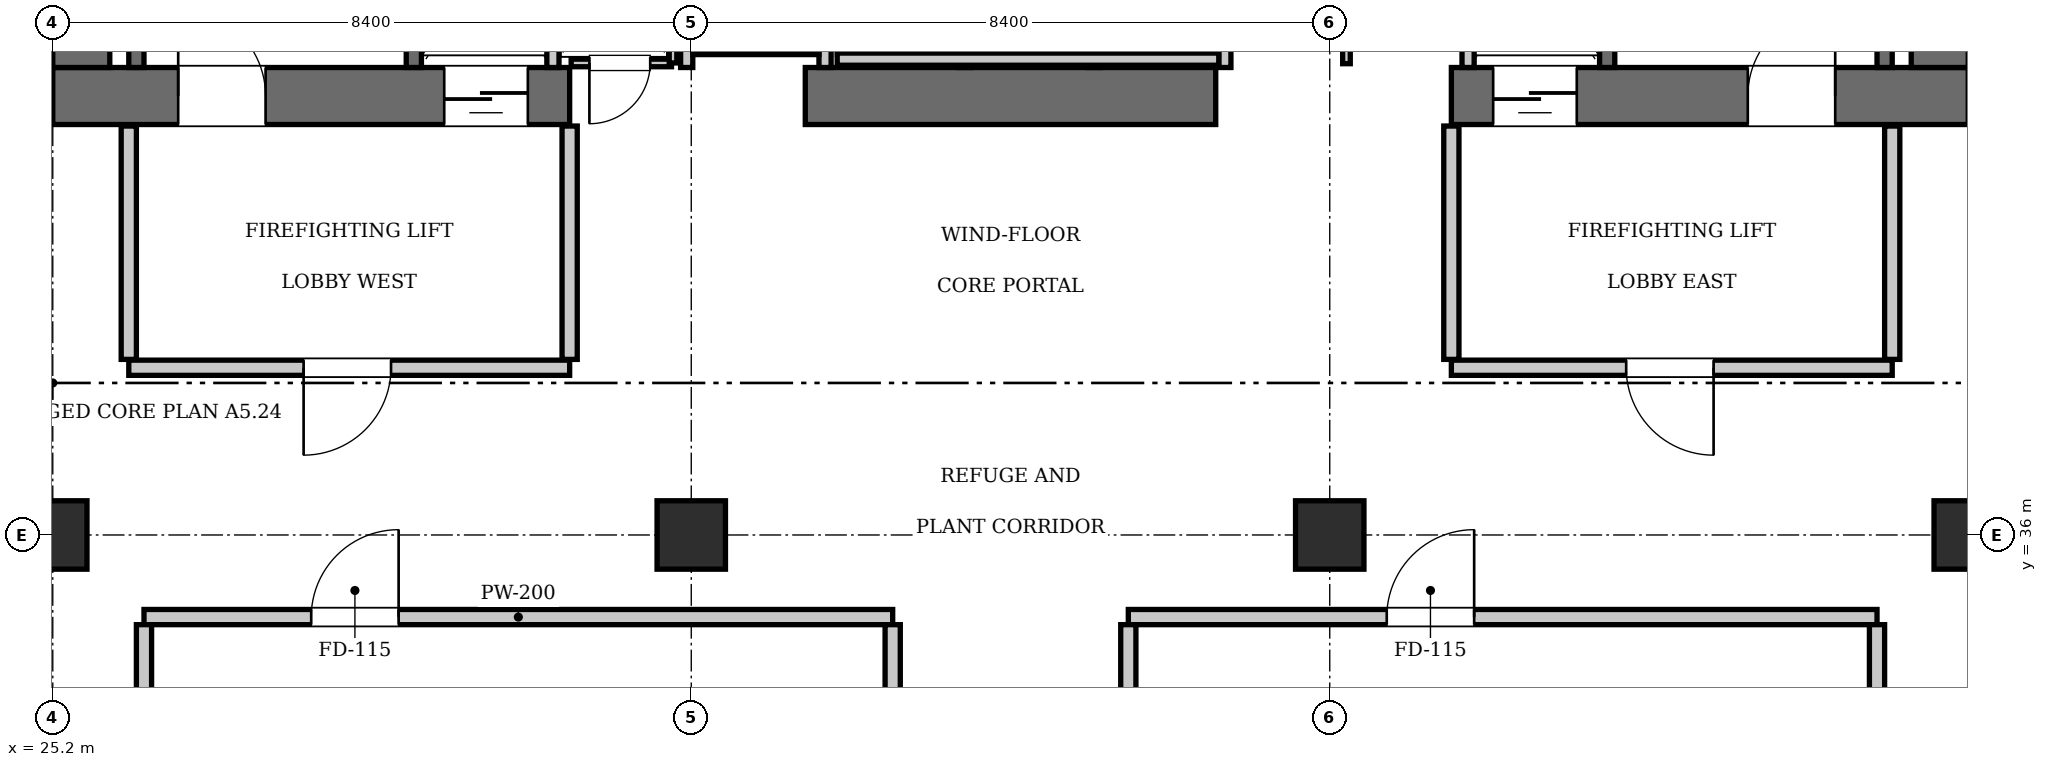
"""IFC4 building model, lengths in metres.
Left out: names, types, materials, properties, quantities, classifications, styles, units other than length and angle.
Written with IfcOpenShell. Run it as: python <this file> out.ifc"""

import sys

from ifc_helpers import new_model, si_unit, direction, frame, frame_2d, origin, origin_2d, place, context, subcontext, project, spatial, rectangle, extrude, element, fill, save


model = new_model("IFC4")
c1 = context("Model", 3, precision=1e-05, world=origin(), true_north=direction((0.0, 1.0)))
c2 = subcontext(c1, "Body", "Model", "MODEL_VIEW")
j1 = project(units=[si_unit("LENGTHUNIT", "METRE"), si_unit("PLANEANGLEUNIT", "RADIAN")], contexts=[c1])
p1 = place(None, origin())
s1 = spatial("IfcSite", under=j1, at=p1, CompositionType="ELEMENT")
p2 = place(p1, origin())
s2 = spatial("IfcBuilding", under=s1, at=p2, CompositionType="ELEMENT")
p3 = place(p2, frame((0.0, 0.0, 227.5)))
s3 = spatial("IfcBuildingStorey", under=s2, at=p3, CompositionType="ELEMENT", Elevation=227.5)
p4 = place(p3, frame((25.2, 41.775, 0.0), z_axis=(0.0, 0.0, 1.0), x_axis=(1.0, 0.0, 0.0)))
e1 = element("IfcWall", 1, at=p4, inside=s3, PredefinedType="SHEAR", context=c2, shape_type="SweptSolid", body=[
    extrude(rectangle(XDim=6.8, YDim=0.75, at=frame_2d((3.4, 0.0))), origin(), (0.0, 0.0, 1.0), 7.0),
])
p5 = place(p4, frame((1.65, 0.0, 0.0)))
e2 = element("IfcOpeningElement", 2, at=p5, cuts=e1, PredefinedType="OPENING", context=c2, shape_type="SweptSolid", body=[
    extrude(rectangle(XDim=1.15, YDim=2.15, at=frame_2d((0.575, 1.075))), frame((0.0, 0.385, 0.0), z_axis=(0.0, -1.0, 0.0), x_axis=(1.0, 0.0, 0.0)), (0.0, 0.0, 1.0), 0.77),
])
p6 = place(p4, frame((5.15, 0.0, 0.0)))
e3 = element("IfcOpeningElement", 3, at=p6, cuts=e1, PredefinedType="OPENING", context=c2, shape_type="SweptSolid", body=[
    extrude(rectangle(XDim=1.1, YDim=2.2, at=frame_2d((0.55, 1.1))), frame((0.0, 0.385, 0.0), z_axis=(0.0, -1.0, 0.0), x_axis=(1.0, 0.0, 0.0)), (0.0, 0.0, 1.0), 0.77),
])
p7 = place(p3, frame((35.1, 41.775, 0.0), z_axis=(0.0, 0.0, 1.0), x_axis=(1.0, 0.0, 0.0)))
e4 = element("IfcWall", 4, at=p7, inside=s3, PredefinedType="SHEAR", context=c2, shape_type="SweptSolid", body=[
    extrude(rectangle(XDim=5.4, YDim=0.75, at=frame_2d((2.7, 0.0))), origin(), (0.0, 0.0, 1.0), 7.0),
])
p8 = place(p3, frame((43.6, 41.775, 0.0), z_axis=(0.0, 0.0, 1.0), x_axis=(1.0, 0.0, 0.0)))
e5 = element("IfcWall", 5, at=p8, inside=s3, PredefinedType="SHEAR", context=c2, shape_type="SweptSolid", body=[
    extrude(rectangle(XDim=6.8, YDim=0.75, at=frame_2d((3.4, 0.0))), origin(), (0.0, 0.0, 1.0), 7.0),
])
p9 = place(p8, frame((3.9, 0.0, 0.0)))
e6 = element("IfcOpeningElement", 6, at=p9, cuts=e5, PredefinedType="OPENING", context=c2, shape_type="SweptSolid", body=[
    extrude(rectangle(XDim=1.15, YDim=2.15, at=frame_2d((0.575, 1.075))), frame((0.0, 0.385, 0.0), z_axis=(0.0, -1.0, 0.0), x_axis=(1.0, 0.0, 0.0)), (0.0, 0.0, 1.0), 0.77),
])
p10 = place(p8, frame((0.55, 0.0, 0.0)))
e7 = element("IfcOpeningElement", 7, at=p10, cuts=e5, PredefinedType="OPENING", context=c2, shape_type="SweptSolid", body=[
    extrude(rectangle(XDim=1.1, YDim=2.2, at=frame_2d((0.55, 1.1))), frame((0.0, 0.385, 0.0), z_axis=(0.0, -1.0, 0.0), x_axis=(1.0, 0.0, 0.0)), (0.0, 0.0, 1.0), 0.77),
])
for number, where, z_axis, x_axis in (
    (8, (25.575, 42.15, 0.0), (0.0, 0.0, 1.0), (0.0, 1.0, 0.0)),
    (9, (50.025, 42.15, 0.0), (0.0, 0.0, 1.0), (0.0, 1.0, 0.0)),
):
    element("IfcWall", number, at=place(p3, frame(where, z_axis=z_axis, x_axis=x_axis)), inside=s3, PredefinedType="SHEAR", context=c2, shape_type="SweptSolid", body=[
        extrude(rectangle(XDim=1.9, YDim=0.75, at=frame_2d((0.95, 0.0))), origin(), (0.0, 0.0, 1.0), 7.0),
    ])
for number, where, z_axis, x_axis in (
    (10, (25.2, 36.0, 0.0), (0.0, 0.0, 1.0), (1.0, 0.0, 0.0)),
    (11, (33.6, 36.0, 0.0), (0.0, 0.0, 1.0), (1.0, 0.0, 0.0)),
    (12, (42.0, 36.0, 0.0), (0.0, 0.0, 1.0), (1.0, 0.0, 0.0)),
    (13, (50.4, 36.0, 0.0), (0.0, 0.0, 1.0), (1.0, 0.0, 0.0)),
):
    element("IfcColumn", number, at=place(p3, frame(where, z_axis=z_axis, x_axis=x_axis)), inside=s3, PredefinedType="COLUMN", context=c2, shape_type="SweptSolid", body=[
        extrude(rectangle(XDim=0.9, YDim=0.9, at=origin_2d()), origin(), (0.0, 0.0, 1.0), 7.0),
    ])
p11 = place(p3, frame((29.95, 42.15, 0.0), z_axis=(0.0, 0.0, 1.0), x_axis=(0.0, 1.0, 0.0)))
e14 = element("IfcWall", 14, at=p11, inside=s3, PredefinedType="SOLIDWALL", context=c2, shape_type="SweptSolid", body=[
    extrude(rectangle(XDim=9.0, YDim=0.2, at=frame_2d((4.5, 0.0))), origin(), (0.0, 0.0, 1.0), 6.76),
])
p12 = place(p3, frame((26.3, 42.15, 0.0), z_axis=(0.0, 0.0, 1.0), x_axis=(0.0, 1.0, 0.0)))
e15 = element("IfcWall", 15, at=p12, inside=s3, PredefinedType="SOLIDWALL", context=c2, shape_type="SweptSolid", body=[
    extrude(rectangle(XDim=1.87, YDim=0.2, at=frame_2d((0.935, 0.0))), origin(), (0.0, 0.0, 1.0), 6.76),
])
p13 = place(p3, frame((45.65, 42.15, 0.0), z_axis=(0.0, 0.0, 1.0), x_axis=(0.0, 1.0, 0.0)))
e16 = element("IfcWall", 16, at=p13, inside=s3, PredefinedType="SOLIDWALL", context=c2, shape_type="SweptSolid", body=[
    extrude(rectangle(XDim=9.0, YDim=0.2, at=frame_2d((4.5, 0.0))), origin(), (0.0, 0.0, 1.0), 6.76),
])
p14 = place(p3, frame((49.3, 42.15, 0.0), z_axis=(0.0, 0.0, 1.0), x_axis=(0.0, 1.0, 0.0)))
e17 = element("IfcWall", 17, at=p14, inside=s3, PredefinedType="SOLIDWALL", context=c2, shape_type="SweptSolid", body=[
    extrude(rectangle(XDim=1.87, YDim=0.2, at=frame_2d((0.935, 0.0))), origin(), (0.0, 0.0, 1.0), 6.76),
])
for number, where, z_axis, x_axis in (
    (18, (31.78, 42.15, 0.0), (0.0, 0.0, 1.0), (0.0, 1.0, 0.0)),
    (19, (43.82, 42.15, 0.0), (0.0, 0.0, 1.0), (0.0, 1.0, 0.0)),
):
    element("IfcWall", number, at=place(p3, frame(where, z_axis=z_axis, x_axis=x_axis)), inside=s3, PredefinedType="SOLIDWALL", context=c2, shape_type="SweptSolid", body=[
        extrude(rectangle(XDim=2.59, YDim=0.16, at=frame_2d((1.295, 0.0))), origin(), (0.0, 0.0, 1.0), 6.76),
    ])
for number, where, z_axis, x_axis in (
    (20, (37.2, 42.15, 0.0), (0.0, 0.0, 1.0), (0.0, 1.0, 0.0)),
    (21, (38.9, 42.15, 0.0), (0.0, 0.0, 1.0), (0.0, 1.0, 0.0)),
    (22, (40.62, 42.15, 0.0), (0.0, 0.0, 1.0), (0.0, 1.0, 0.0)),
):
    element("IfcWall", number, at=place(p3, frame(where, z_axis=z_axis, x_axis=x_axis)), inside=s3, PredefinedType="SOLIDWALL", context=c2, shape_type="SweptSolid", body=[
        extrude(rectangle(XDim=2.2, YDim=0.16, at=frame_2d((1.1, 0.0))), origin(), (0.0, 0.0, 1.0), 6.76),
    ])
p15 = place(p3, frame((35.52, 42.26, 0.0), z_axis=(0.0, 0.0, 1.0), x_axis=(1.0, 0.0, 0.0)))
e23 = element("IfcWall", 23, at=p15, inside=s3, PredefinedType="SOLIDWALL", context=c2, shape_type="SweptSolid", body=[
    extrude(rectangle(XDim=5.02, YDim=0.16, at=frame_2d((2.51, 0.0))), origin(), (0.0, 0.0, 1.0), 6.76),
])
for number, where, z_axis, x_axis in (
    (24, (33.54, 42.15, 0.0), (0.0, 0.0, 1.0), (0.0, 1.0, 0.0)),
    (25, (35.36, 42.15, 0.0), (0.0, 0.0, 1.0), (0.0, 1.0, 0.0)),
):
    element("IfcWall", number, at=place(p3, frame(where, z_axis=z_axis, x_axis=x_axis)), inside=s3, PredefinedType="SOLIDWALL", context=c2, shape_type="SweptSolid", body=[
        extrude(rectangle(XDim=2.25, YDim=0.16, at=frame_2d((1.125, 0.0))), origin(), (0.0, 0.0, 1.0), 6.76),
    ])
p16 = place(p3, frame((33.62, 42.4, 0.0), z_axis=(0.0, 0.0, 1.0), x_axis=(1.0, 0.0, 0.0)))
e26 = element("IfcWall", 26, at=p16, inside=s3, PredefinedType="SOLIDWALL", context=c2, shape_type="SweptSolid", body=[
    extrude(rectangle(XDim=1.66, YDim=0.16, at=frame_2d((0.83, 0.0))), origin(), (0.0, 0.0, 1.0), 6.76),
])
p17 = place(p3, frame((26.2, 38.2, 0.0), z_axis=(0.0, 0.0, 1.0), x_axis=(1.0, 0.0, 0.0)))
e27 = element("IfcWall", 27, at=p17, inside=s3, PredefinedType="PARTITIONING", context=c2, shape_type="SweptSolid", body=[
    extrude(rectangle(XDim=5.8, YDim=0.2, at=frame_2d((2.9, 0.0))), origin(), (0.0, 0.0, 1.0), 6.76),
])
p18 = place(p17, frame((2.3, 0.0, 0.0)))
e28 = element("IfcOpeningElement", 28, at=p18, cuts=e27, PredefinedType="OPENING", context=c2, shape_type="SweptSolid", body=[
    extrude(rectangle(XDim=1.15, YDim=2.15, at=frame_2d((0.575, 1.075))), frame((0.0, 0.11, 0.0), z_axis=(0.0, -1.0, 0.0), x_axis=(1.0, 0.0, 0.0)), (0.0, 0.0, 1.0), 0.22),
])
for number, where, z_axis, x_axis in (
    (29, (26.2, 38.31, 0.0), (0.0, 0.0, 1.0), (0.0, 1.0, 0.0)),
    (30, (32.0, 38.31, 0.0), (0.0, 0.0, 1.0), (0.0, 1.0, 0.0)),
):
    element("IfcWall", number, at=place(p3, frame(where, z_axis=z_axis, x_axis=x_axis)), inside=s3, PredefinedType="PARTITIONING", context=c2, shape_type="SweptSolid", body=[
        extrude(rectangle(XDim=3.07, YDim=0.2, at=frame_2d((1.535, 0.0))), origin(), (0.0, 0.0, 1.0), 6.76),
    ])
p19 = place(p3, frame((43.6, 38.2, 0.0), z_axis=(0.0, 0.0, 1.0), x_axis=(1.0, 0.0, 0.0)))
e31 = element("IfcWall", 31, at=p19, inside=s3, PredefinedType="PARTITIONING", context=c2, shape_type="SweptSolid", body=[
    extrude(rectangle(XDim=5.8, YDim=0.2, at=frame_2d((2.9, 0.0))), origin(), (0.0, 0.0, 1.0), 6.76),
])
p20 = place(p19, frame((2.3, 0.0, 0.0)))
e32 = element("IfcOpeningElement", 32, at=p20, cuts=e31, PredefinedType="OPENING", context=c2, shape_type="SweptSolid", body=[
    extrude(rectangle(XDim=1.15, YDim=2.15, at=frame_2d((0.575, 1.075))), frame((0.0, 0.11, 0.0), z_axis=(0.0, -1.0, 0.0), x_axis=(1.0, 0.0, 0.0)), (0.0, 0.0, 1.0), 0.22),
])
for number, where, z_axis, x_axis in (
    (33, (43.6, 38.31, 0.0), (0.0, 0.0, 1.0), (0.0, 1.0, 0.0)),
    (34, (49.4, 38.31, 0.0), (0.0, 0.0, 1.0), (0.0, 1.0, 0.0)),
):
    element("IfcWall", number, at=place(p3, frame(where, z_axis=z_axis, x_axis=x_axis)), inside=s3, PredefinedType="PARTITIONING", context=c2, shape_type="SweptSolid", body=[
        extrude(rectangle(XDim=3.07, YDim=0.2, at=frame_2d((1.535, 0.0))), origin(), (0.0, 0.0, 1.0), 6.76),
    ])
p21 = place(p3, frame((32.02, 42.21, 0.0), z_axis=(0.0, 0.0, 1.0), x_axis=(1.0, 0.0, 0.0)))
e35 = element("IfcWall", 35, at=p21, inside=s3, PredefinedType="PARTITIONING", context=c2, shape_type="SweptSolid", body=[
    extrude(rectangle(XDim=1.32, YDim=0.1, at=frame_2d((0.66, 0.0))), origin(), (0.0, 0.0, 1.0), 6.76),
])
p22 = place(p21, frame((0.24, 0.0, 0.0)))
e36 = element("IfcOpeningElement", 36, at=p22, cuts=e35, PredefinedType="OPENING", context=c2, shape_type="SweptSolid", body=[
    extrude(rectangle(XDim=0.8, YDim=2.05, at=frame_2d((0.4, 1.025))), frame((0.0, 0.06, 0.0), z_axis=(0.0, -1.0, 0.0), x_axis=(1.0, 0.0, 0.0)), (0.0, 0.0, 1.0), 0.12),
])
p23 = place(p3, frame((33.36, 42.21, 0.0), z_axis=(0.0, 0.0, 1.0), x_axis=(0.0, 1.0, 0.0)))
e37 = element("IfcWall", 37, at=p23, inside=s3, PredefinedType="PARTITIONING", context=c2, shape_type="SweptSolid", body=[
    extrude(rectangle(XDim=2.73, YDim=0.1, at=frame_2d((1.365, 0.0))), origin(), (0.0, 0.0, 1.0), 6.76),
])
p24 = place(p3, frame((42.22, 42.2, 0.0), z_axis=(0.0, 0.0, 1.0), x_axis=(0.0, 1.0, 0.0)))
e38 = element("IfcWall", 38, at=p24, inside=s3, PredefinedType="PARTITIONING", context=c2, shape_type="SweptSolid", body=[
    extrude(rectangle(XDim=2.76, YDim=0.1, at=frame_2d((1.38, 0.0))), origin(), (0.0, 0.0, 1.0), 6.76),
])
p25 = place(p24, frame((0.65, 0.0, 0.0)))
e39 = element("IfcOpeningElement", 39, at=p25, cuts=e38, PredefinedType="OPENING", context=c2, shape_type="SweptSolid", body=[
    extrude(rectangle(XDim=0.8, YDim=2.05, at=frame_2d((0.4, 1.025))), frame((0.0, 0.06, 0.0), z_axis=(0.0, -1.0, 0.0), x_axis=(1.0, 0.0, 0.0)), (0.0, 0.0, 1.0), 0.12),
])
p26 = place(p3, frame((26.4, 34.92, 0.0), z_axis=(0.0, 0.0, 1.0), x_axis=(1.0, 0.0, 0.0)))
e40 = element("IfcWall", 40, at=p26, inside=s3, PredefinedType="PARTITIONING", context=c2, shape_type="SweptSolid", body=[
    extrude(rectangle(XDim=9.85, YDim=0.2, at=frame_2d((4.925, 0.0))), origin(), (0.0, 0.0, 1.0), 6.76),
])
p27 = place(p26, frame((2.2, 0.0, 0.0)))
e41 = element("IfcOpeningElement", 41, at=p27, cuts=e40, PredefinedType="OPENING", context=c2, shape_type="SweptSolid", body=[
    extrude(rectangle(XDim=1.15, YDim=2.15, at=frame_2d((0.575, 1.075))), frame((0.0, 0.11, 0.0), z_axis=(0.0, -1.0, 0.0), x_axis=(1.0, 0.0, 0.0)), (0.0, 0.0, 1.0), 0.22),
])
p28 = place(p3, frame((26.4, 14.3, 0.0), z_axis=(0.0, 0.0, 1.0), x_axis=(0.0, 1.0, 0.0)))
e42 = element("IfcWall", 42, at=p28, inside=s3, PredefinedType="PARTITIONING", context=c2, shape_type="SweptSolid", body=[
    extrude(rectangle(XDim=20.52, YDim=0.2, at=frame_2d((10.26, 0.0))), origin(), (0.0, 0.0, 1.0), 6.76),
])
p29 = place(p3, frame((36.25, 28.45, 0.0), z_axis=(0.0, 0.0, 1.0), x_axis=(0.0, 1.0, 0.0)))
e43 = element("IfcWall", 43, at=p29, inside=s3, PredefinedType="PARTITIONING", context=c2, shape_type="SweptSolid", body=[
    extrude(rectangle(XDim=6.37, YDim=0.2, at=frame_2d((3.185, 0.0))), origin(), (0.0, 0.0, 1.0), 6.76),
])
p30 = place(p3, frame((39.35, 34.92, 0.0), z_axis=(0.0, 0.0, 1.0), x_axis=(1.0, 0.0, 0.0)))
e44 = element("IfcWall", 44, at=p30, inside=s3, PredefinedType="PARTITIONING", context=c2, shape_type="SweptSolid", body=[
    extrude(rectangle(XDim=9.85, YDim=0.2, at=frame_2d((4.925, 0.0))), origin(), (0.0, 0.0, 1.0), 6.76),
])
p31 = place(p30, frame((3.4, 0.0, 0.0)))
e45 = element("IfcOpeningElement", 45, at=p31, cuts=e44, PredefinedType="OPENING", context=c2, shape_type="SweptSolid", body=[
    extrude(rectangle(XDim=1.15, YDim=2.15, at=frame_2d((0.575, 1.075))), frame((0.0, 0.11, 0.0), z_axis=(0.0, -1.0, 0.0), x_axis=(1.0, 0.0, 0.0)), (0.0, 0.0, 1.0), 0.22),
])
p32 = place(p3, frame((49.2, 14.3, 0.0), z_axis=(0.0, 0.0, 1.0), x_axis=(0.0, 1.0, 0.0)))
e46 = element("IfcWall", 46, at=p32, inside=s3, PredefinedType="PARTITIONING", context=c2, shape_type="SweptSolid", body=[
    extrude(rectangle(XDim=20.52, YDim=0.2, at=frame_2d((10.26, 0.0))), origin(), (0.0, 0.0, 1.0), 6.76),
])
p33 = place(p3, frame((39.35, 28.45, 0.0), z_axis=(0.0, 0.0, 1.0), x_axis=(0.0, 1.0, 0.0)))
e47 = element("IfcWall", 47, at=p33, inside=s3, PredefinedType="PARTITIONING", context=c2, shape_type="SweptSolid", body=[
    extrude(rectangle(XDim=6.37, YDim=0.2, at=frame_2d((3.185, 0.0))), origin(), (0.0, 0.0, 1.0), 6.76),
])
p34 = place(p5, origin())
e48 = element("IfcDoor", 48, at=p34, inside=s3, OperationType="SINGLE_SWING_LEFT", PredefinedType="DOOR", context=c2, shape_type="SweptSolid", body=[
    extrude(rectangle(XDim=1.15, YDim=2.15, at=frame_2d((0.575, 1.075))), frame((0.0, 0.025, 0.0), z_axis=(0.0, -1.0, 0.0), x_axis=(1.0, 0.0, 0.0)), (0.0, 0.0, 1.0), 0.05),
])
fill(e2, e48)
p35 = place(p9, origin())
e49 = element("IfcDoor", 49, at=p35, inside=s3, OperationType="SINGLE_SWING_RIGHT", PredefinedType="DOOR", context=c2, shape_type="SweptSolid", body=[
    extrude(rectangle(XDim=1.15, YDim=2.15, at=frame_2d((0.575, 1.075))), frame((0.0, 0.025, 0.0), z_axis=(0.0, -1.0, 0.0), x_axis=(1.0, 0.0, 0.0)), (0.0, 0.0, 1.0), 0.05),
])
fill(e6, e49)
p36 = place(p6, frame((1.1, 0.0, 0.0), z_axis=(0.0, 0.0, 1.0), x_axis=(-1.0, 0.0, 0.0)))
e50 = element("IfcDoor", 50, at=p36, inside=s3, OperationType="SLIDING_TO_LEFT", PredefinedType="DOOR", context=c2, shape_type="SweptSolid", body=[
    extrude(rectangle(XDim=1.1, YDim=2.2, at=frame_2d((0.55, 1.1))), frame((0.0, 0.025, 0.0), z_axis=(0.0, -1.0, 0.0), x_axis=(1.0, 0.0, 0.0)), (0.0, 0.0, 1.0), 0.05),
])
fill(e3, e50)
p37 = place(p10, frame((1.1, 0.0, 0.0), z_axis=(0.0, 0.0, 1.0), x_axis=(-1.0, 0.0, 0.0)))
e51 = element("IfcDoor", 51, at=p37, inside=s3, OperationType="SLIDING_TO_LEFT", PredefinedType="DOOR", context=c2, shape_type="SweptSolid", body=[
    extrude(rectangle(XDim=1.1, YDim=2.2, at=frame_2d((0.55, 1.1))), frame((0.0, 0.025, 0.0), z_axis=(0.0, -1.0, 0.0), x_axis=(1.0, 0.0, 0.0)), (0.0, 0.0, 1.0), 0.05),
])
fill(e7, e51)
p38 = place(p18, frame((1.15, 0.0, 0.0), z_axis=(0.0, 0.0, 1.0), x_axis=(-1.0, 0.0, 0.0)))
e52 = element("IfcDoor", 52, at=p38, inside=s3, OperationType="SINGLE_SWING_RIGHT", PredefinedType="DOOR", context=c2, shape_type="SweptSolid", body=[
    extrude(rectangle(XDim=1.15, YDim=2.15, at=frame_2d((0.575, 1.075))), frame((0.0, 0.025, 0.0), z_axis=(0.0, -1.0, 0.0), x_axis=(1.0, 0.0, 0.0)), (0.0, 0.0, 1.0), 0.05),
])
fill(e28, e52)
p39 = place(p20, frame((1.15, 0.0, 0.0), z_axis=(0.0, 0.0, 1.0), x_axis=(-1.0, 0.0, 0.0)))
e53 = element("IfcDoor", 53, at=p39, inside=s3, OperationType="SINGLE_SWING_LEFT", PredefinedType="DOOR", context=c2, shape_type="SweptSolid", body=[
    extrude(rectangle(XDim=1.15, YDim=2.15, at=frame_2d((0.575, 1.075))), frame((0.0, 0.025, 0.0), z_axis=(0.0, -1.0, 0.0), x_axis=(1.0, 0.0, 0.0)), (0.0, 0.0, 1.0), 0.05),
])
fill(e32, e53)
p40 = place(p22, frame((0.8, 0.0, 0.0), z_axis=(0.0, 0.0, 1.0), x_axis=(-1.0, 0.0, 0.0)))
e54 = element("IfcDoor", 54, at=p40, inside=s3, OperationType="SINGLE_SWING_RIGHT", PredefinedType="DOOR", context=c2, shape_type="SweptSolid", body=[
    extrude(rectangle(XDim=0.8, YDim=2.05, at=frame_2d((0.4, 1.025))), frame((0.0, 0.025, 0.0), z_axis=(0.0, -1.0, 0.0), x_axis=(1.0, 0.0, 0.0)), (0.0, 0.0, 1.0), 0.05),
])
fill(e36, e54)
p41 = place(p27, origin())
e55 = element("IfcDoor", 55, at=p41, inside=s3, OperationType="SINGLE_SWING_RIGHT", PredefinedType="DOOR", context=c2, shape_type="SweptSolid", body=[
    extrude(rectangle(XDim=1.15, YDim=2.15, at=frame_2d((0.575, 1.075))), frame((0.0, 0.025, 0.0), z_axis=(0.0, -1.0, 0.0), x_axis=(1.0, 0.0, 0.0)), (0.0, 0.0, 1.0), 0.05),
])
fill(e41, e55)
p42 = place(p31, origin())
e56 = element("IfcDoor", 56, at=p42, inside=s3, OperationType="SINGLE_SWING_RIGHT", PredefinedType="DOOR", context=c2, shape_type="SweptSolid", body=[
    extrude(rectangle(XDim=1.15, YDim=2.15, at=frame_2d((0.575, 1.075))), frame((0.0, 0.025, 0.0), z_axis=(0.0, -1.0, 0.0), x_axis=(1.0, 0.0, 0.0)), (0.0, 0.0, 1.0), 0.05),
])
fill(e45, e56)
save(model, sys.argv[1])
